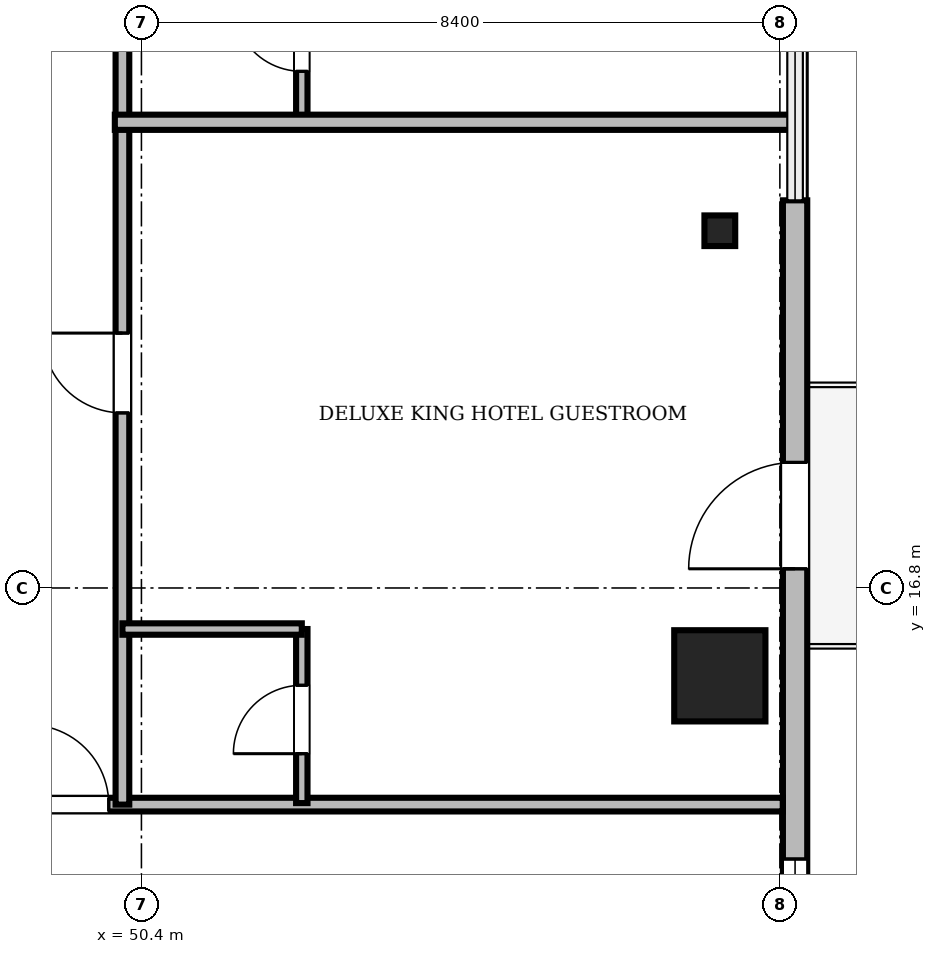
"""IFC4 building model, lengths in metres.
Left out: names, types, materials, properties, quantities, classifications, styles, units other than length and angle.
Written with IfcOpenShell. Run it as: python <this file> out.ifc"""

import sys

from ifc_helpers import new_model, si_unit, direction, frame, frame_2d, origin, origin_2d, place, context, subcontext, project, spatial, rectangle, i_section, extrude, source, transform, mapped, element, fill, save


model = new_model("IFC4")
c1 = context("Model", 3, precision=1e-05, world=origin(), true_north=direction((0.0, 1.0)))
c2 = subcontext(c1, "Body", "Model", "MODEL_VIEW")
j1 = project(units=[si_unit("LENGTHUNIT", "METRE"), si_unit("PLANEANGLEUNIT", "RADIAN")], contexts=[c1])
p1 = place(None, origin())
s1 = spatial("IfcSite", under=j1, at=p1, CompositionType="ELEMENT")
p2 = place(p1, origin())
s2 = spatial("IfcBuilding", under=s1, at=p2, CompositionType="ELEMENT")
p3 = place(p2, frame((0.0, 0.0, 278.25)))
s3 = spatial("IfcBuildingStorey", under=s2, at=p3, CompositionType="ELEMENT", Elevation=278.25)
m1 = source(origin(), c2, "Body", "SweptSolid", [
    extrude(rectangle(XDim=1.2, YDim=1.2, at=origin_2d()), origin(), (0.0, 0.0, 1.0), 3.354),
])
p4 = place(p3, frame((58.01, 15.644, 0.0), z_axis=(-0.161027839264, 0.076218873286, 0.984002397526), x_axis=(-0.427822851259, -0.90386260457, 0.0)))
e1 = element("IfcColumn", 1, at=p4, inside=s3, PredefinedType="COLUMN", context=c2, shape_type="MappedRepresentation", body=[
    mapped(m1, transform((0.0, 0.0, 0.0), scale=1.0)),
])
m2 = source(origin(), c2, "Body", "SweptSolid", [
    extrude(i_section(OverallWidth=0.405, OverallDepth=0.403, WebThickness=0.018, FlangeThickness=0.028, FilletRadius=0.015, at=origin_2d()), origin(), (0.0, 0.0, 1.0), 3.344),
])
p5 = place(p3, frame((58.01, 21.5, 0.0), z_axis=(-0.161497617931, 0.0, 0.986873101975), x_axis=(0.0, -1.0, 0.0)))
e2 = element("IfcColumn", 2, at=p5, inside=s3, PredefinedType="COLUMN", context=c2, shape_type="MappedRepresentation", body=[
    mapped(m2, transform((0.0, 0.0, 0.0), scale=1.0)),
])
m3 = source(origin(), c2, "Body", "SweptSolid", [
    extrude(rectangle(XDim=12.626, YDim=0.32, at=frame_2d((6.313, 0.0))), origin(), (0.0, 0.0, 1.0), 3.3),
])
p6 = place(p3, frame((59.0, 9.274, 0.0), z_axis=(0.0, 0.0, 1.0), x_axis=(0.0, 1.0, 0.0)))
e3 = element("IfcWall", 3, at=p6, inside=s3, PredefinedType="SOLIDWALL", context=c2, shape_type="MappedRepresentation", body=[
    mapped(m3, transform((0.0, 0.0, 0.0), scale=1.0)),
])
m4 = source(origin(), c2, "Body", "SweptSolid", [
    extrude(rectangle(XDim=1.4, YDim=2.3, at=frame_2d((0.7, 1.15))), frame((0.0, 0.17, 0.0), z_axis=(0.0, -1.0, 0.0), x_axis=(1.0, 0.0, 0.0)), (0.0, 0.0, 1.0), 0.34),
])
p7 = place(p6, frame((7.778, 0.0, 0.0)))
e4 = element("IfcOpeningElement", 4, at=p7, cuts=e3, PredefinedType="OPENING", context=c2, shape_type="MappedRepresentation", body=[
    mapped(m4, transform((0.0, 0.0, 0.0), scale=1.0)),
])
m5 = source(origin(), c2, "Body", "SweptSolid", [
    extrude(rectangle(XDim=1.8, YDim=2.4, at=frame_2d((0.9, 1.2))), frame((0.0, 0.17, 0.0), z_axis=(0.0, -1.0, 0.0), x_axis=(1.0, 0.0, 0.0)), (0.0, 0.0, 1.0), 0.34),
])
p8 = place(p6, frame((2.16, 0.0, 0.64)))
e5 = element("IfcOpeningElement", 5, at=p8, cuts=e3, PredefinedType="OPENING", context=c2, shape_type="MappedRepresentation", body=[
    mapped(m5, transform((0.0, 0.0, 0.0), scale=1.0)),
])
m6 = source(origin(), c2, "Body", "SweptSolid", [
    extrude(rectangle(XDim=39.676, YDim=0.18, at=frame_2d((19.838, 0.0))), origin(), (0.0, 0.0, 1.0), 2.08),
])
p9 = place(p3, frame((19.162, 13.95, 0.0), z_axis=(0.0, 0.0, 1.0), x_axis=(1.0, 0.0, 0.0)))
e6 = element("IfcWall", 6, at=p9, inside=s3, PredefinedType="PARTITIONING", context=c2, shape_type="MappedRepresentation", body=[
    mapped(m6, transform((0.0, 0.0, 0.0), scale=1.0)),
])
m7 = source(origin(), c2, "Body", "SweptSolid", [
    extrude(rectangle(XDim=1.05, YDim=2.2, at=frame_2d((0.525, 1.1))), frame((0.0, 0.1, 0.0), z_axis=(0.0, -1.0, 0.0), x_axis=(1.0, 0.0, 0.0)), (0.0, 0.0, 1.0), 0.2),
])
p10 = place(p9, frame((7.758, 0.0, 0.0)))
e7 = element("IfcOpeningElement", 7, at=p10, cuts=e6, PredefinedType="OPENING", context=c2, shape_type="MappedRepresentation", body=[
    mapped(m7, transform((0.0, 0.0, 0.0), scale=1.0)),
])
p11 = place(p9, frame((11.846, 0.0, 0.0)))
e8 = element("IfcOpeningElement", 8, at=p11, cuts=e6, PredefinedType="OPENING", context=c2, shape_type="MappedRepresentation", body=[
    mapped(m7, transform((0.0, 0.0, 0.0), scale=1.0)),
])
p12 = place(p9, frame((18.363, 0.0, 0.0)))
e9 = element("IfcOpeningElement", 9, at=p12, cuts=e6, PredefinedType="OPENING", context=c2, shape_type="MappedRepresentation", body=[
    mapped(m7, transform((0.0, 0.0, 0.0), scale=1.0)),
])
p13 = place(p9, frame((24.88, 0.0, 0.0)))
e10 = element("IfcOpeningElement", 10, at=p13, cuts=e6, PredefinedType="OPENING", context=c2, shape_type="MappedRepresentation", body=[
    mapped(m7, transform((0.0, 0.0, 0.0), scale=1.0)),
])
p14 = place(p9, frame((29.758, 0.0, 0.0)))
e11 = element("IfcOpeningElement", 11, at=p14, cuts=e6, PredefinedType="OPENING", context=c2, shape_type="MappedRepresentation", body=[
    mapped(m7, transform((0.0, 0.0, 0.0), scale=1.0)),
])
m8 = source(origin(), c2, "Body", "SweptSolid", [
    extrude(rectangle(XDim=27.15, YDim=0.18, at=frame_2d((13.575, 0.0))), origin(), (0.0, 0.0, 1.0), 2.742),
])
p15 = place(p3, frame((50.15, 13.95, 0.0), z_axis=(0.0, 0.0, 1.0), x_axis=(0.0, 1.0, 0.0)))
e12 = element("IfcWall", 12, at=p15, inside=s3, PredefinedType="PARTITIONING", context=c2, shape_type="MappedRepresentation", body=[
    mapped(m8, transform((0.0, 0.0, 0.0), scale=1.0)),
])
p16 = place(p15, frame((5.153, 0.0, 0.0)))
e13 = element("IfcOpeningElement", 13, at=p16, cuts=e12, PredefinedType="OPENING", context=c2, shape_type="MappedRepresentation", body=[
    mapped(m7, transform((0.0, 0.0, 0.0), scale=1.0)),
])
p17 = place(p15, frame((14.13, 0.0, 0.0)))
e14 = element("IfcOpeningElement", 14, at=p17, cuts=e12, PredefinedType="OPENING", context=c2, shape_type="MappedRepresentation", body=[
    mapped(m7, transform((0.0, 0.0, 0.0), scale=1.0)),
])
p18 = place(p15, frame((23.107, 0.0, 0.0)))
e15 = element("IfcOpeningElement", 15, at=p18, cuts=e12, PredefinedType="OPENING", context=c2, shape_type="MappedRepresentation", body=[
    mapped(m7, transform((0.0, 0.0, 0.0), scale=1.0)),
])
m9 = source(origin(), c2, "Body", "SweptSolid", [
    extrude(rectangle(XDim=2.29, YDim=0.15, at=frame_2d((1.145, 0.0))), origin(), (0.0, 0.0, 1.0), 2.742),
])
p19 = place(p3, frame((52.51, 13.97, 0.0), z_axis=(0.0, 0.0, 1.0), x_axis=(0.0, 1.0, 0.0)))
e16 = element("IfcWall", 16, at=p19, inside=s3, PredefinedType="PARTITIONING", context=c2, shape_type="MappedRepresentation", body=[
    mapped(m9, transform((0.0, 0.0, 0.0), scale=1.0)),
])
m10 = source(origin(), c2, "Body", "SweptSolid", [
    extrude(rectangle(XDim=0.9, YDim=2.1, at=frame_2d((0.45, 1.05))), frame((0.0, 0.085, 0.0), z_axis=(0.0, -1.0, 0.0), x_axis=(1.0, 0.0, 0.0)), (0.0, 0.0, 1.0), 0.17),
])
p20 = place(p19, frame((0.65, 0.0, 0.0)))
e17 = element("IfcOpeningElement", 17, at=p20, cuts=e16, PredefinedType="OPENING", context=c2, shape_type="MappedRepresentation", body=[
    mapped(m10, transform((0.0, 0.0, 0.0), scale=1.0)),
])
m11 = source(origin(), c2, "Body", "SweptSolid", [
    extrude(rectangle(XDim=2.29, YDim=0.15, at=frame_2d((1.145, 0.0))), origin(), (0.0, 0.0, 1.0), 2.992),
])
p21 = place(p3, frame((52.51, 22.947, 0.0), z_axis=(0.0, 0.0, 1.0), x_axis=(0.0, 1.0, 0.0)))
e18 = element("IfcWall", 18, at=p21, inside=s3, PredefinedType="PARTITIONING", context=c2, shape_type="MappedRepresentation", body=[
    mapped(m11, transform((0.0, 0.0, 0.0), scale=1.0)),
])
p22 = place(p21, frame((0.65, 0.0, 0.0)))
e19 = element("IfcOpeningElement", 19, at=p22, cuts=e18, PredefinedType="OPENING", context=c2, shape_type="MappedRepresentation", body=[
    mapped(m10, transform((0.0, 0.0, 0.0), scale=1.0)),
])
m12 = source(origin(), c2, "Body", "SweptSolid", [
    extrude(rectangle(XDim=8.98, YDim=0.2, at=frame_2d((4.49, 0.0))), origin(), (0.0, 0.0, 1.0), 2.08),
])
p23 = place(p3, frame((50.05, 22.927, 0.0), z_axis=(0.0, 0.0, 1.0), x_axis=(1.0, 0.0, 0.0)))
e20 = element("IfcWall", 20, at=p23, inside=s3, PredefinedType="PARTITIONING", context=c2, shape_type="MappedRepresentation", body=[
    mapped(m12, transform((0.0, 0.0, 0.0), scale=1.0)),
])
m13 = source(origin(), c2, "Body", "SweptSolid", [
    extrude(rectangle(XDim=2.36, YDim=0.15, at=frame_2d((1.18, 0.0))), origin(), (0.0, 0.0, 1.0), 2.742),
])
p24 = place(p3, frame((50.15, 16.26, 0.0), z_axis=(0.0, 0.0, 1.0), x_axis=(1.0, 0.0, 0.0)))
e21 = element("IfcWall", 21, at=p24, inside=s3, PredefinedType="PARTITIONING", context=c2, shape_type="MappedRepresentation", body=[
    mapped(m13, transform((0.0, 0.0, 0.0), scale=1.0)),
])
m14 = source(origin(), c2, "Body", "SweptSolid", [
    extrude(rectangle(XDim=1.4, YDim=2.3, at=frame_2d((0.7, 1.15))), frame((0.0, 0.025, 0.0), z_axis=(0.0, -1.0, 0.0), x_axis=(1.0, 0.0, 0.0)), (0.0, 0.0, 1.0), 0.05),
])
p25 = place(p7, frame((1.4, 0.0, 0.0), z_axis=(0.0, 0.0, 1.0), x_axis=(-1.0, 0.0, 0.0)))
e22 = element("IfcDoor", 22, at=p25, inside=s3, OperationType="DOUBLE_DOOR_SLIDING", PredefinedType="DOOR", context=c2, shape_type="MappedRepresentation", body=[
    mapped(m14, transform((0.0, 0.0, 0.0), scale=1.0)),
])
fill(e4, e22)
m15 = source(origin(), c2, "Body", "SweptSolid", [
    extrude(rectangle(XDim=1.8, YDim=2.4, at=frame_2d((0.9, 1.2))), frame((0.0, 0.03, 0.0), z_axis=(0.0, -1.0, 0.0), x_axis=(1.0, 0.0, 0.0)), (0.0, 0.0, 1.0), 0.06),
])
p26 = place(p8, origin())
e23 = element("IfcWindow", 23, at=p26, inside=s3, PartitioningType="SINGLE_PANEL", PredefinedType="WINDOW", context=c2, shape_type="MappedRepresentation", body=[
    mapped(m15, transform((0.0, 0.0, 0.0), scale=1.0)),
])
fill(e5, e23)
m16 = source(origin(), c2, "Body", "SweptSolid", [
    extrude(rectangle(XDim=1.05, YDim=2.2, at=frame_2d((0.525, 1.1))), frame((0.0, 0.025, 0.0), z_axis=(0.0, -1.0, 0.0), x_axis=(1.0, 0.0, 0.0)), (0.0, 0.0, 1.0), 0.05),
])
p27 = place(p14, origin())
e24 = element("IfcDoor", 24, at=p27, inside=s3, OperationType="SINGLE_SWING_LEFT", PredefinedType="DOOR", context=c2, shape_type="MappedRepresentation", body=[
    mapped(m16, transform((0.0, 0.0, 0.0), scale=1.0)),
])
fill(e11, e24)
p28 = place(p16, origin())
e25 = element("IfcDoor", 25, at=p28, inside=s3, OperationType="SINGLE_SWING_RIGHT", PredefinedType="DOOR", context=c2, shape_type="MappedRepresentation", body=[
    mapped(m16, transform((0.0, 0.0, 0.0), scale=1.0)),
])
fill(e13, e25)
m17 = source(origin(), c2, "Body", "SweptSolid", [
    extrude(rectangle(XDim=0.9, YDim=2.1, at=frame_2d((0.45, 1.05))), frame((0.0, 0.025, 0.0), z_axis=(0.0, -1.0, 0.0), x_axis=(1.0, 0.0, 0.0)), (0.0, 0.0, 1.0), 0.05),
])
p29 = place(p20, origin())
e26 = element("IfcDoor", 26, at=p29, inside=s3, OperationType="SINGLE_SWING_LEFT", PredefinedType="DOOR", context=c2, shape_type="MappedRepresentation", body=[
    mapped(m17, transform((0.0, 0.0, 0.0), scale=1.0)),
])
fill(e17, e26)
p30 = place(p22, origin())
e27 = element("IfcDoor", 27, at=p30, inside=s3, OperationType="SINGLE_SWING_RIGHT", PredefinedType="DOOR", context=c2, shape_type="MappedRepresentation", body=[
    mapped(m17, transform((0.0, 0.0, 0.0), scale=1.0)),
])
fill(e19, e27)
save(model, sys.argv[1])
